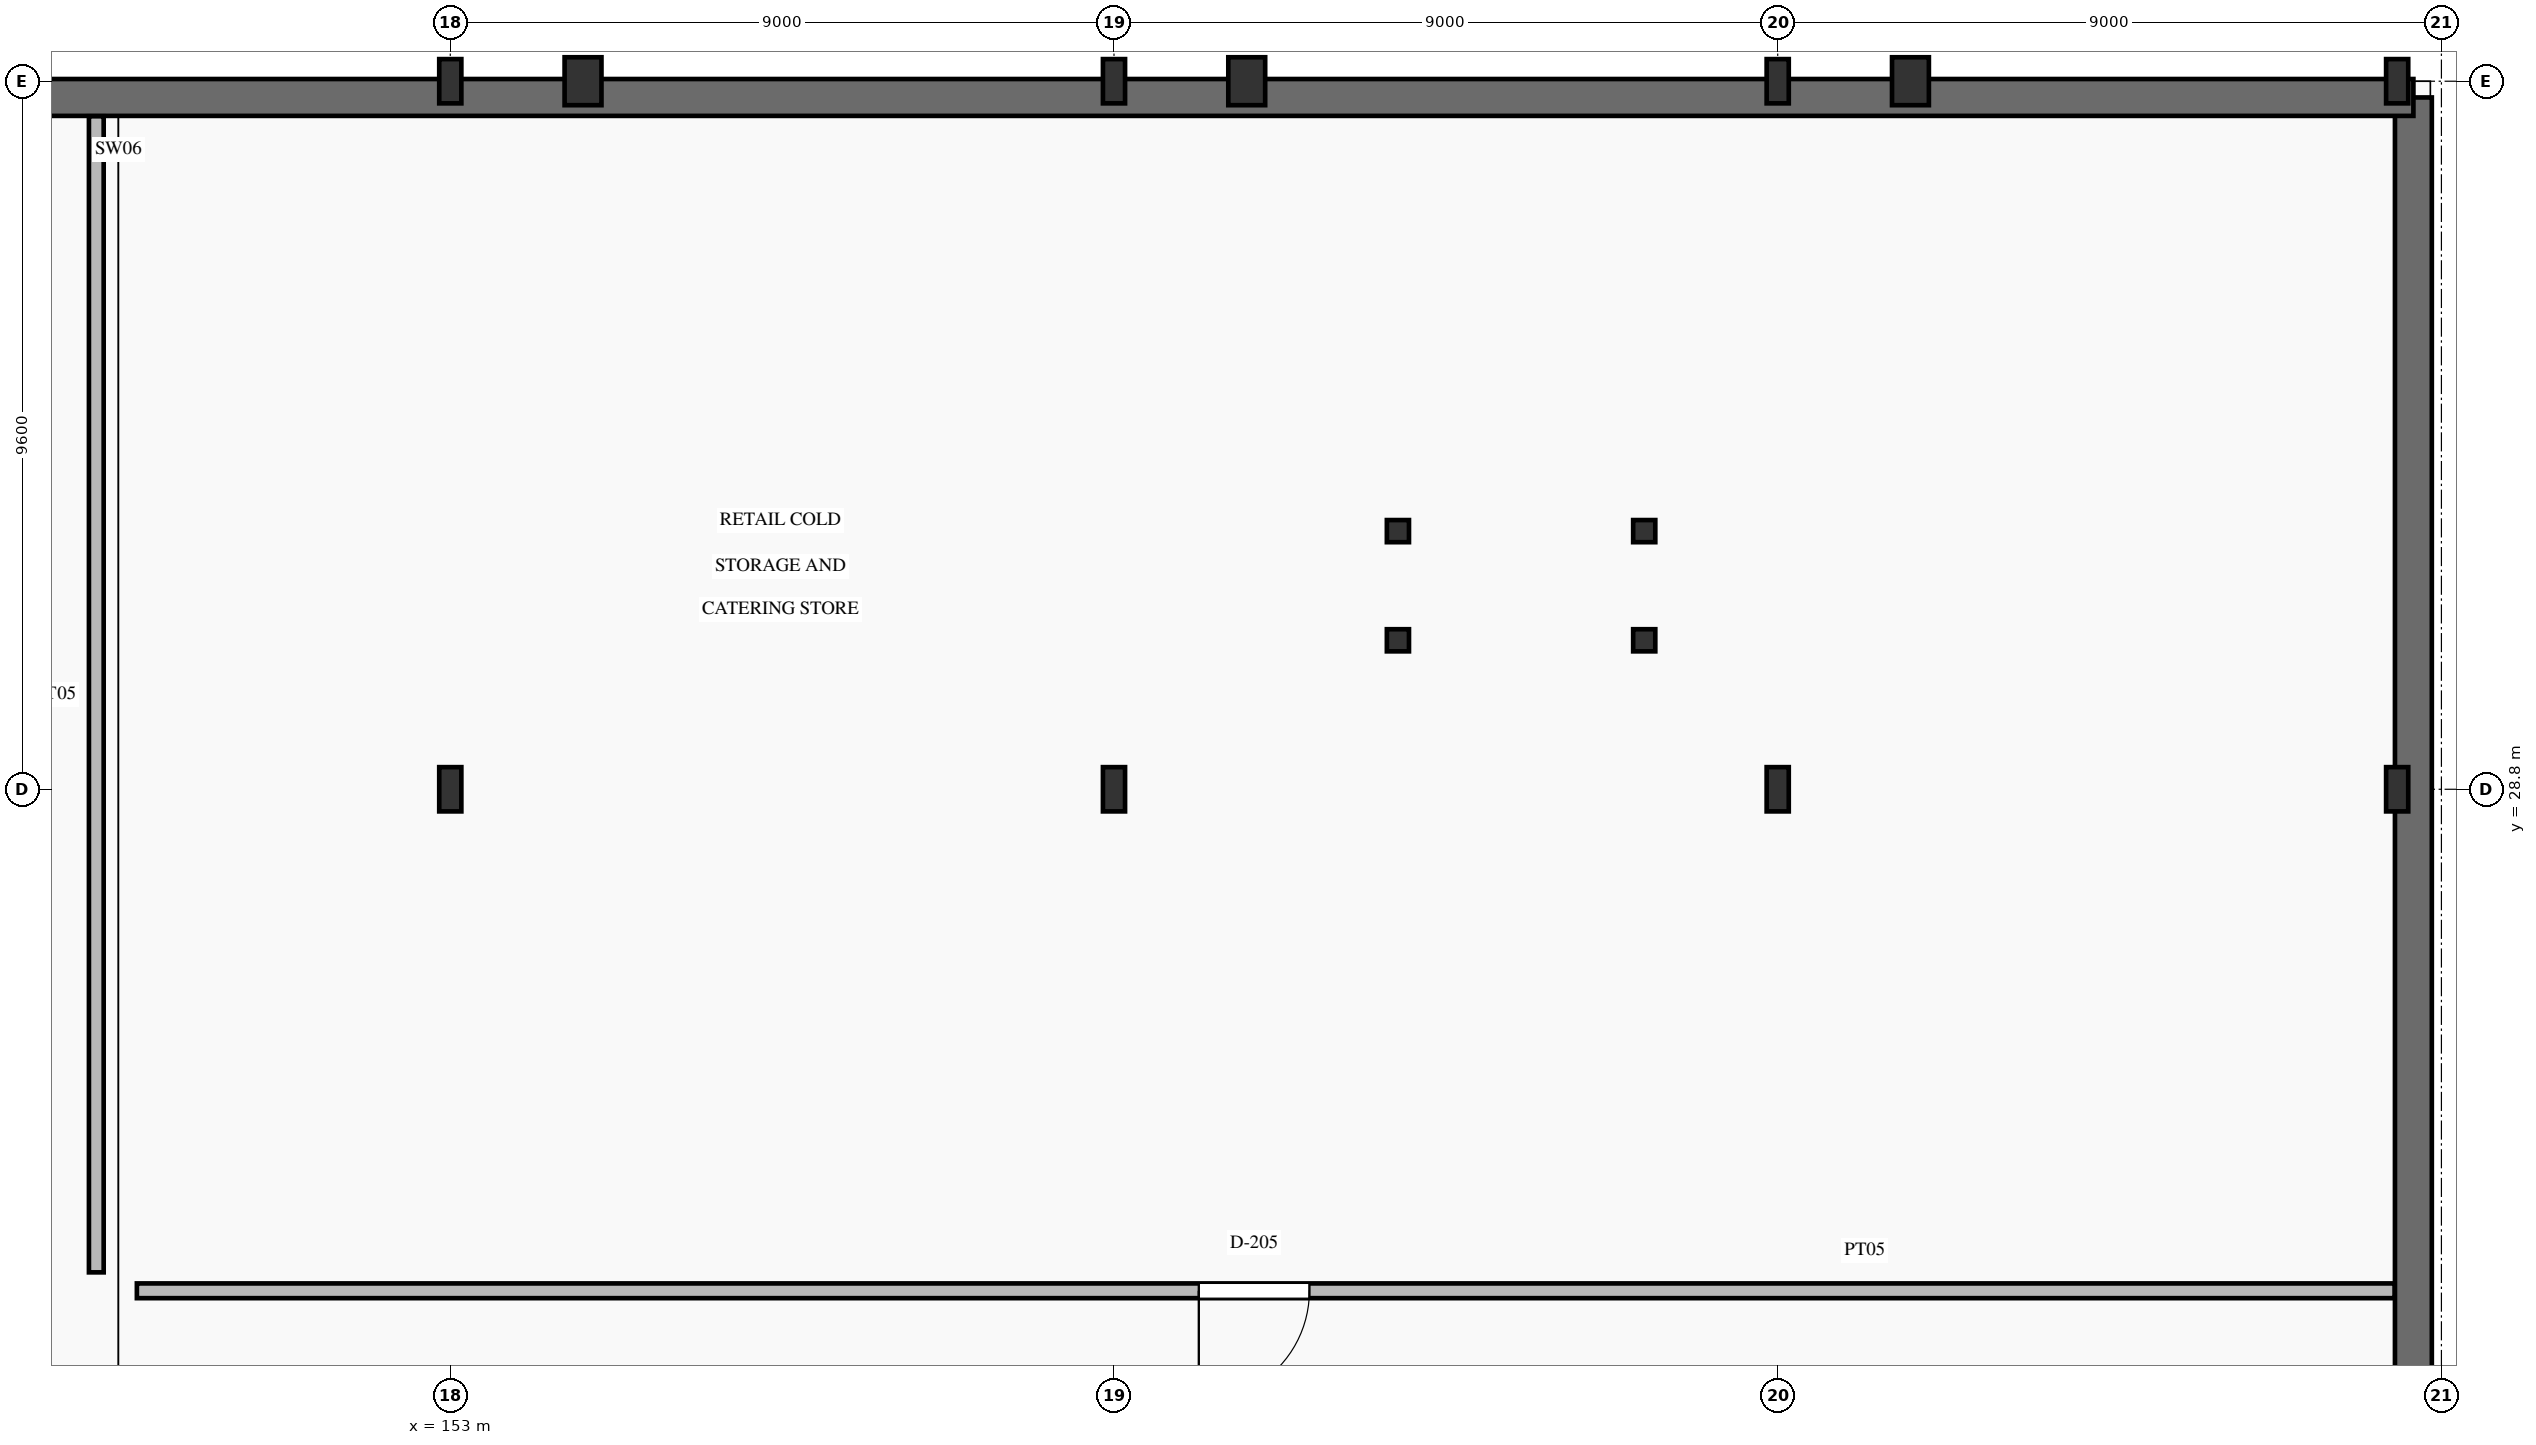
"""IFC4 building model, lengths in metres.
Left out: names, types, materials, properties, quantities, classifications, styles, units other than length and angle.
Written with IfcOpenShell. Run it as: python <this file> out.ifc"""

import sys

from ifc_helpers import new_model, si_unit, direction, frame, frame_2d, origin, origin_2d, place, context, subcontext, project, spatial, rectangle, i_section, extrude, element, fill, save


model = new_model("IFC4")
c1 = context("Model", 3, precision=1e-05, world=origin(), true_north=direction((0.0, 1.0)))
c2 = subcontext(c1, "Body", "Model", "MODEL_VIEW")
j1 = project(units=[si_unit("LENGTHUNIT", "METRE"), si_unit("PLANEANGLEUNIT", "RADIAN")], contexts=[c1])
p1 = place(None, origin())
s1 = spatial("IfcSite", under=j1, at=p1, CompositionType="ELEMENT")
p2 = place(p1, origin())
s2 = spatial("IfcBuilding", under=s1, at=p2, CompositionType="ELEMENT")
p3 = place(p2, frame((0.0, 0.0, -4.5)))
s3 = spatial("IfcBuildingStorey", under=s2, at=p3, CompositionType="ELEMENT", Elevation=-4.5)
for number, where, z_axis, x_axis in (
    (1, (153.0, 28.8, 0.0), (0.0, 0.0, 1.0), (1.0, 0.0, 0.0)),
    (2, (153.0, 38.4, 0.0), (0.0, 0.0, 1.0), (1.0, 0.0, 0.0)),
    (3, (162.0, 28.8, 0.0), (0.0, 0.0, 1.0), (1.0, 0.0, 0.0)),
    (4, (162.0, 38.4, 0.0), (0.0, 0.0, 1.0), (1.0, 0.0, 0.0)),
    (5, (171.0, 28.8, 0.0), (0.0, 0.0, 1.0), (1.0, 0.0, 0.0)),
    (6, (171.0, 38.4, 0.0), (0.0, 0.0, 1.0), (1.0, 0.0, 0.0)),
    (7, (179.4, 28.8, 0.0), (0.0, 0.0, 1.0), (1.0, 0.0, 0.0)),
    (8, (179.4, 38.4, 0.0), (0.0, 0.0, 1.0), (1.0, 0.0, 0.0)),
):
    element("IfcColumn", number, at=place(p3, frame(where, z_axis=z_axis, x_axis=x_axis)), inside=s3, PredefinedType="COLUMN", context=c2, shape_type="SweptSolid", body=[
        extrude(i_section(OverallWidth=0.3, OverallDepth=0.6, WebThickness=0.015, FlangeThickness=0.03, FilletRadius=0.027, at=origin_2d()), origin(), (0.0, 0.0, 1.0), 4.5),
    ])
for number, where, z_axis, x_axis in (
    (9, (154.8, 38.4, 0.0), (0.0, 0.0, 1.0), (1.0, 0.0, 0.0)),
    (10, (163.8, 38.4, 0.0), (0.0, 0.0, 1.0), (1.0, 0.0, 0.0)),
    (11, (172.8, 38.4, 0.0), (0.0, 0.0, 1.0), (1.0, 0.0, 0.0)),
):
    element("IfcColumn", number, at=place(p3, frame(where, z_axis=z_axis, x_axis=x_axis)), inside=s3, PredefinedType="PILASTER", context=c2, shape_type="SweptSolid", body=[
        extrude(rectangle(XDim=0.5, YDim=0.65, at=origin_2d()), origin(), (0.0, 0.0, 1.0), 4.5),
    ])
p4 = place(p3, frame((179.62, 0.22, 0.0), z_axis=(0.0, 0.0, 1.0), x_axis=(0.0, 1.0, 0.0)))
e12 = element("IfcWall", 12, at=p4, inside=s3, PredefinedType="SHEAR", context=c2, shape_type="SweptSolid", body=[
    extrude(rectangle(XDim=37.96, YDim=0.5, at=frame_2d((18.98, 0.0))), origin(), (0.0, 0.0, 1.0), 4.2),
])
p5 = place(p3, frame((179.62, 38.18, 0.0), z_axis=(0.0, 0.0, 1.0), x_axis=(-1.0, 0.0, 0.0)))
e13 = element("IfcWall", 13, at=p5, inside=s3, PredefinedType="SHEAR", context=c2, shape_type="SweptSolid", body=[
    extrude(rectangle(XDim=62.24, YDim=0.5, at=frame_2d((31.12, 0.0))), origin(), (0.0, 0.0, 1.0), 4.2),
])
for number, where, z_axis, x_axis in (
    (14, (165.85, 32.3, 0.0), (0.0, 0.0, 1.0), (1.0, 0.0, 0.0)),
    (15, (165.85, 30.82, 0.0), (0.0, 0.0, 1.0), (1.0, 0.0, 0.0)),
    (16, (169.19, 32.3, 0.0), (0.0, 0.0, 1.0), (1.0, 0.0, 0.0)),
    (17, (169.19, 30.82, 0.0), (0.0, 0.0, 1.0), (1.0, 0.0, 0.0)),
):
    element("IfcColumn", number, at=place(p3, frame(where, z_axis=z_axis, x_axis=x_axis)), inside=s3, PredefinedType="COLUMN", context=c2, shape_type="SweptSolid", body=[
        extrude(i_section(OverallWidth=0.3, OverallDepth=0.3, WebThickness=0.011, FlangeThickness=0.019, FilletRadius=0.027, at=origin_2d()), origin(), (0.0, 0.0, 1.0), 4.5),
    ])
p6 = place(p3, frame((148.75, 22.0, 0.0), z_axis=(0.0, 0.0, 1.0), x_axis=(1.0, 0.0, 0.0)))
e18 = element("IfcWall", 18, at=p6, inside=s3, PredefinedType="PARTITIONING", context=c2, shape_type="SweptSolid", body=[
    extrude(rectangle(XDim=30.615, YDim=0.2, at=frame_2d((15.308, 0.0))), origin(), (0.0, 0.0, 1.0), 4.2),
])
p7 = place(p6, frame((14.4, 0.0, 0.0)))
e19 = element("IfcOpeningElement", 19, at=p7, cuts=e18, PredefinedType="OPENING", context=c2, shape_type="SweptSolid", body=[
    extrude(rectangle(XDim=1.5, YDim=2.25, at=frame_2d((0.75, 1.125))), frame((0.0, 0.115, 0.0), z_axis=(0.0, -1.0, 0.0), x_axis=(1.0, 0.0, 0.0)), (0.0, 0.0, 1.0), 0.23),
])
p8 = place(p3, frame((148.2, 22.25, 0.0), z_axis=(0.0, 0.0, 1.0), x_axis=(0.0, 1.0, 0.0)))
e20 = element("IfcWall", 20, at=p8, inside=s3, PredefinedType="PARTITIONING", context=c2, shape_type="SweptSolid", body=[
    extrude(rectangle(XDim=15.675, YDim=0.2, at=frame_2d((7.837, 0.0))), origin(), (0.0, 0.0, 1.0), 4.2),
])
p9 = place(p7, frame((1.5, 0.0, 0.0), z_axis=(0.0, 0.0, 1.0), x_axis=(-1.0, 0.0, 0.0)))
e21 = element("IfcDoor", 21, at=p9, inside=s3, OperationType="SINGLE_SWING_LEFT", PredefinedType="DOOR", context=c2, shape_type="SweptSolid", body=[
    extrude(rectangle(XDim=1.5, YDim=2.25, at=frame_2d((0.75, 1.125))), frame((0.0, 0.025, 0.0), z_axis=(0.0, -1.0, 0.0), x_axis=(1.0, 0.0, 0.0)), (0.0, 0.0, 1.0), 0.05),
])
fill(e19, e21)
save(model, sys.argv[1])
